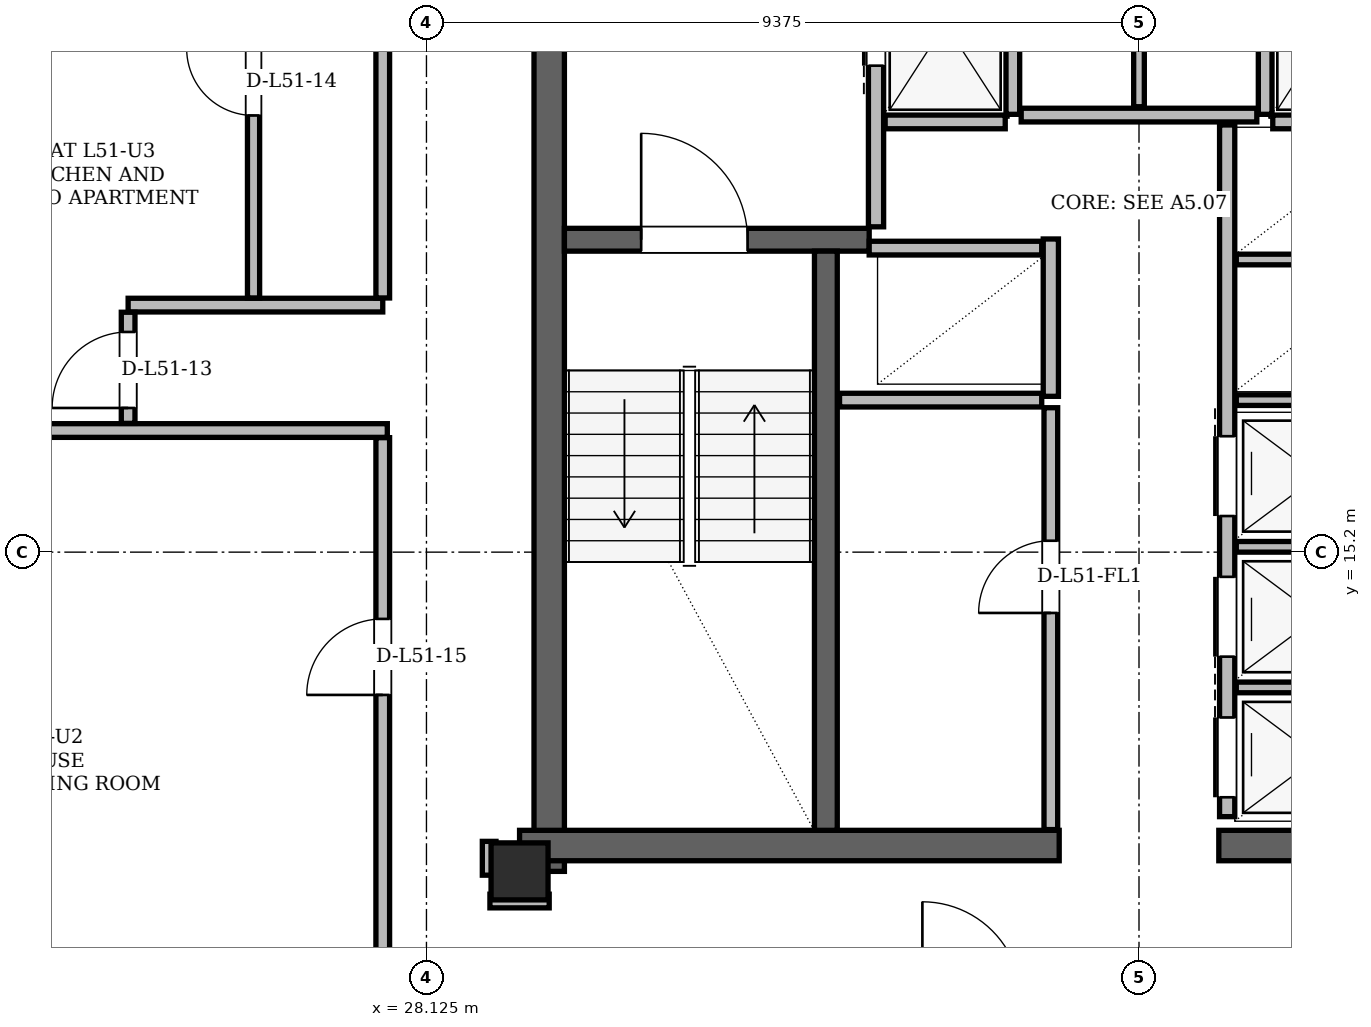
"""IFC4 building model, lengths in metres.
Left out: names, types, materials, properties, quantities, classifications, styles, units other than length and angle.
Written with IfcOpenShell. Run it as: python <this file> out.ifc"""

import sys

from ifc_helpers import new_model, si_unit, direction, frame, frame_2d, origin, origin_2d, place, context, subcontext, project, spatial, rectangle, hollow_rectangle, extrude, element, fill, save


model = new_model("IFC4")
c1 = context("Model", 3, precision=1e-05, world=origin(), true_north=direction((0.0, 1.0)))
c2 = subcontext(c1, "Body", "Model", "MODEL_VIEW")
j1 = project(units=[si_unit("LENGTHUNIT", "METRE"), si_unit("PLANEANGLEUNIT", "RADIAN")], contexts=[c1])
p1 = place(None, origin())
s1 = spatial("IfcSite", under=j1, at=p1, CompositionType="ELEMENT")
p2 = place(p1, origin())
s2 = spatial("IfcBuilding", under=s1, at=p2, CompositionType="ELEMENT")
p3 = place(p2, frame((0.0, 0.0, 193.8)))
s3 = spatial("IfcBuildingStorey", under=s2, at=p3, CompositionType="ELEMENT", Elevation=193.8)
p4 = place(p3, frame((29.35, 11.0, 0.0), z_axis=(0.0, 0.0, 1.0), x_axis=(1.0, 0.0, 0.0)))
e1 = element("IfcColumn", 1, at=p4, inside=s3, PredefinedType="COLUMN", context=c2, shape_type="SweptSolid", body=[
    extrude(hollow_rectangle(XDim=0.75, YDim=0.75, WallThickness=0.06, at=origin_2d()), origin(), (0.0, 0.0, 1.0), 3.6),
])
p5 = place(p3, frame((29.74, 11.0, 0.0), z_axis=(0.0, 0.0, 1.0), x_axis=(0.0, 1.0, 0.0)))
e2 = element("IfcWall", 2, at=p5, inside=s3, PredefinedType="SHEAR", context=c2, shape_type="SweptSolid", body=[
    extrude(rectangle(XDim=13.3, YDim=0.4, at=frame_2d((6.65, 0.0))), origin(), (0.0, 0.0, 1.0), 3.38),
])
for number, where, z_axis, x_axis in (
    (3, (29.35, 11.34, 0.0), (0.0, 0.0, 1.0), (1.0, 0.0, 0.0)),
    (4, (38.55, 11.34, 0.0), (0.0, 0.0, 1.0), (1.0, 0.0, 0.0)),
):
    element("IfcWall", number, at=place(p3, frame(where, z_axis=z_axis, x_axis=x_axis)), inside=s3, PredefinedType="SHEAR", context=c2, shape_type="SweptSolid", body=[
        extrude(rectangle(XDim=7.1, YDim=0.4, at=frame_2d((3.55, 0.0))), origin(), (0.0, 0.0, 1.0), 3.38),
    ])
p6 = place(p3, frame((29.94, 19.31, 0.0), z_axis=(0.0, 0.0, 1.0), x_axis=(1.0, 0.0, 0.0)))
e5 = element("IfcWall", 5, at=p6, inside=s3, PredefinedType="SHEAR", context=c2, shape_type="SweptSolid", body=[
    extrude(rectangle(XDim=4.01, YDim=0.3, at=frame_2d((2.005, 0.0))), origin(), (0.0, 0.0, 1.0), 3.38),
])
p7 = place(p6, frame((1.01, 0.0, 0.0)))
e6 = element("IfcOpeningElement", 6, at=p7, cuts=e5, PredefinedType="OPENING", context=c2, shape_type="SweptSolid", body=[
    extrude(rectangle(XDim=1.4, YDim=2.2, at=frame_2d((0.7, 1.1))), frame((0.0, 0.15, 0.0), z_axis=(0.0, -1.0, 0.0), x_axis=(1.0, 0.0, 0.0)), (0.0, 0.0, 1.0), 0.3),
])
p8 = place(p3, frame((33.38, 11.54, 0.0), z_axis=(0.0, 0.0, 1.0), x_axis=(0.0, 1.0, 0.0)))
e7 = element("IfcWall", 7, at=p8, inside=s3, PredefinedType="SHEAR", context=c2, shape_type="SweptSolid", body=[
    extrude(rectangle(XDim=7.62, YDim=0.3, at=frame_2d((3.81, 0.0))), origin(), (0.0, 0.0, 1.0), 3.38),
])
p9 = place(p3, frame((33.691, 43.219, 0.0), z_axis=(0.0, 0.0, 1.0), x_axis=(-0.499997159266, -0.866027043877, 0.0)))
e8 = element("IfcWall", 8, at=p9, inside=s3, PredefinedType="SOLIDWALL", context=c2, shape_type="SweptSolid", body=[
    extrude(rectangle(XDim=36.235, YDim=0.29, at=frame_2d((18.117, 0.0))), origin(), (0.0, 0.0, 1.0), 2.677),
])
p10 = place(p9, frame((6.579, 0.0, 0.0)))
e9 = element("IfcOpeningElement", 9, at=p10, cuts=e8, PredefinedType="OPENING", context=c2, shape_type="SweptSolid", body=[
    extrude(rectangle(XDim=1.5, YDim=2.2, at=frame_2d((0.75, 1.1))), frame((0.0, 0.145, 0.0), z_axis=(0.0, -1.0, 0.0), x_axis=(1.0, 0.0, 0.0)), (0.0, 0.0, 1.0), 0.29),
])
p11 = place(p9, frame((26.7, 0.0, 0.0)))
e10 = element("IfcOpeningElement", 10, at=p11, cuts=e8, PredefinedType="OPENING", context=c2, shape_type="SweptSolid", body=[
    extrude(rectangle(XDim=1.5, YDim=2.2, at=frame_2d((0.75, 1.1))), frame((0.0, 0.145, 0.0), z_axis=(0.0, -1.0, 0.0), x_axis=(1.0, 0.0, 0.0)), (0.0, 0.0, 1.0), 0.29),
])
p12 = place(p9, frame((32.74, 0.0, 0.85)))
e11 = element("IfcOpeningElement", 11, at=p12, cuts=e8, PredefinedType="OPENING", context=c2, shape_type="SweptSolid", body=[
    extrude(rectangle(XDim=2.4, YDim=1.717, at=frame_2d((1.2, 0.858))), frame((0.0, 0.145, 0.0), z_axis=(0.0, -1.0, 0.0), x_axis=(1.0, 0.0, 0.0)), (0.0, 0.0, 1.0), 0.29),
])
p13 = place(p9, frame((21.971, 0.0, 0.85)))
e12 = element("IfcOpeningElement", 12, at=p13, cuts=e8, PredefinedType="OPENING", context=c2, shape_type="SweptSolid", body=[
    extrude(rectangle(XDim=2.0, YDim=1.717, at=frame_2d((1.0, 0.858))), frame((0.0, 0.145, 0.0), z_axis=(0.0, -1.0, 0.0), x_axis=(1.0, 0.0, 0.0)), (0.0, 0.0, 1.0), 0.29),
])
p14 = place(p9, frame((2.383, 0.0, 0.85)))
e13 = element("IfcOpeningElement", 13, at=p14, cuts=e8, PredefinedType="OPENING", context=c2, shape_type="SweptSolid", body=[
    extrude(rectangle(XDim=1.6, YDim=1.7, at=frame_2d((0.8, 0.85))), frame((0.0, 0.145, 0.0), z_axis=(0.0, -1.0, 0.0), x_axis=(1.0, 0.0, 0.0)), (0.0, 0.0, 1.0), 0.29),
])
p15 = place(p9, frame((13.348, 0.0, 0.85)))
e14 = element("IfcOpeningElement", 14, at=p15, cuts=e8, PredefinedType="OPENING", context=c2, shape_type="SweptSolid", body=[
    extrude(rectangle(XDim=3.0, YDim=1.717, at=frame_2d((1.5, 0.858))), frame((0.0, 0.145, 0.0), z_axis=(0.0, -1.0, 0.0), x_axis=(1.0, 0.0, 0.0)), (0.0, 0.0, 1.0), 0.29),
])
p16 = place(p3, frame((34.04, 19.48, 0.0), z_axis=(0.0, 0.0, 1.0), x_axis=(0.0, 1.0, 0.0)))
e15 = element("IfcWall", 15, at=p16, inside=s3, PredefinedType="PARTITIONING", context=c2, shape_type="SweptSolid", body=[
    extrude(rectangle(XDim=4.5, YDim=0.2, at=frame_2d((2.25, 0.0))), origin(), (0.0, 0.0, 1.0), 3.38),
])
p17 = place(p16, frame((2.12, 0.0, 0.0)))
e16 = element("IfcOpeningElement", 16, at=p17, cuts=e15, PredefinedType="OPENING", context=c2, shape_type="SweptSolid", body=[
    extrude(rectangle(XDim=1.1, YDim=2.2, at=frame_2d((0.55, 1.1))), frame((0.0, 0.1, 0.0), z_axis=(0.0, -1.0, 0.0), x_axis=(1.0, 0.0, 0.0)), (0.0, 0.0, 1.0), 0.2),
])
p18 = place(p3, frame((35.84, 20.96, 0.0), z_axis=(0.0, 0.0, 1.0), x_axis=(0.0, 1.0, 0.0)))
e17 = element("IfcWall", 17, at=p18, inside=s3, PredefinedType="PARTITIONING", context=c2, shape_type="SweptSolid", body=[
    extrude(rectangle(XDim=3.02, YDim=0.18, at=frame_2d((1.51, 0.0))), origin(), (0.0, 0.0, 1.0), 3.38),
])
p19 = place(p3, frame((34.16, 20.86, 0.0), z_axis=(0.0, 0.0, 1.0), x_axis=(1.0, 0.0, 0.0)))
e18 = element("IfcWall", 18, at=p19, inside=s3, PredefinedType="PARTITIONING", context=c2, shape_type="SweptSolid", body=[
    extrude(rectangle(XDim=1.58, YDim=0.18, at=frame_2d((0.79, 0.0))), origin(), (0.0, 0.0, 1.0), 3.38),
])
p20 = place(p3, frame((39.16, 20.96, 0.0), z_axis=(0.0, 0.0, 1.0), x_axis=(0.0, 1.0, 0.0)))
e19 = element("IfcWall", 19, at=p20, inside=s3, PredefinedType="PARTITIONING", context=c2, shape_type="SweptSolid", body=[
    extrude(rectangle(XDim=3.02, YDim=0.18, at=frame_2d((1.51, 0.0))), origin(), (0.0, 0.0, 1.0), 3.38),
])
p21 = place(p3, frame((39.26, 20.86, 0.0), z_axis=(0.0, 0.0, 1.0), x_axis=(1.0, 0.0, 0.0)))
e20 = element("IfcWall", 20, at=p21, inside=s3, PredefinedType="PARTITIONING", context=c2, shape_type="SweptSolid", body=[
    extrude(rectangle(XDim=1.58, YDim=0.18, at=frame_2d((0.79, 0.0))), origin(), (0.0, 0.0, 1.0), 3.38),
])
p22 = place(p3, frame((36.34, 17.25, 0.0), z_axis=(0.0, 0.0, 1.0), x_axis=(0.0, 1.0, 0.0)))
e21 = element("IfcWall", 21, at=p22, inside=s3, PredefinedType="PARTITIONING", context=c2, shape_type="SweptSolid", body=[
    extrude(rectangle(XDim=2.07, YDim=0.2, at=frame_2d((1.035, 0.0))), origin(), (0.0, 0.0, 1.0), 3.38),
])
p23 = place(p3, frame((33.95, 19.2, 0.0), z_axis=(0.0, 0.0, 1.0), x_axis=(1.0, 0.0, 0.0)))
e22 = element("IfcWall", 22, at=p23, inside=s3, PredefinedType="PARTITIONING", context=c2, shape_type="SweptSolid", body=[
    extrude(rectangle(XDim=2.27, YDim=0.18, at=frame_2d((1.135, 0.0))), origin(), (0.0, 0.0, 1.0), 3.38),
])
p24 = place(p3, frame((33.56, 17.2, 0.0), z_axis=(0.0, 0.0, 1.0), x_axis=(1.0, 0.0, 0.0)))
e23 = element("IfcWall", 23, at=p24, inside=s3, PredefinedType="PARTITIONING", context=c2, shape_type="SweptSolid", body=[
    extrude(rectangle(XDim=2.66, YDim=0.18, at=frame_2d((1.33, 0.0))), origin(), (0.0, 0.0, 1.0), 3.38),
])
p25 = place(p3, frame((36.34, 11.55, 0.0), z_axis=(0.0, 0.0, 1.0), x_axis=(0.0, 1.0, 0.0)))
e24 = element("IfcWall", 24, at=p25, inside=s3, PredefinedType="PARTITIONING", context=c2, shape_type="SweptSolid", body=[
    extrude(rectangle(XDim=5.55, YDim=0.18, at=frame_2d((2.775, 0.0))), origin(), (0.0, 0.0, 1.0), 3.38),
])
p26 = place(p25, frame((2.85, 0.0, 0.0)))
e25 = element("IfcOpeningElement", 25, at=p26, cuts=e24, PredefinedType="OPENING", context=c2, shape_type="SweptSolid", body=[
    extrude(rectangle(XDim=0.95, YDim=2.1, at=frame_2d((0.475, 1.05))), frame((0.0, 0.09, 0.0), z_axis=(0.0, -1.0, 0.0), x_axis=(1.0, 0.0, 0.0)), (0.0, 0.0, 1.0), 0.18),
])
p27 = place(p3, frame((38.66, 11.72, 0.0), z_axis=(0.0, 0.0, 1.0), x_axis=(0.0, 1.0, 0.0)))
e26 = element("IfcWall", 26, at=p27, inside=s3, PredefinedType="PARTITIONING", context=c2, shape_type="SweptSolid", body=[
    extrude(rectangle(XDim=9.1, YDim=0.2, at=frame_2d((4.55, 0.0))), origin(), (0.0, 0.0, 1.0), 3.38),
])
p28 = place(p27, frame((0.255, 0.0, 0.0)))
e27 = element("IfcOpeningElement", 27, at=p28, cuts=e26, PredefinedType="OPENING", context=c2, shape_type="SweptSolid", body=[
    extrude(rectangle(XDim=1.05, YDim=2.15, at=frame_2d((0.525, 1.075))), frame((0.0, 0.1, 0.0), z_axis=(0.0, -1.0, 0.0), x_axis=(1.0, 0.0, 0.0)), (0.0, 0.0, 1.0), 0.2),
])
p29 = place(p27, frame((2.105, 0.0, 0.0)))
e28 = element("IfcOpeningElement", 28, at=p29, cuts=e26, PredefinedType="OPENING", context=c2, shape_type="SweptSolid", body=[
    extrude(rectangle(XDim=1.05, YDim=2.15, at=frame_2d((0.525, 1.075))), frame((0.0, 0.1, 0.0), z_axis=(0.0, -1.0, 0.0), x_axis=(1.0, 0.0, 0.0)), (0.0, 0.0, 1.0), 0.2),
])
p30 = place(p27, frame((3.955, 0.0, 0.0)))
e29 = element("IfcOpeningElement", 29, at=p30, cuts=e26, PredefinedType="OPENING", context=c2, shape_type="SweptSolid", body=[
    extrude(rectangle(XDim=1.05, YDim=2.15, at=frame_2d((0.525, 1.075))), frame((0.0, 0.1, 0.0), z_axis=(0.0, -1.0, 0.0), x_axis=(1.0, 0.0, 0.0)), (0.0, 0.0, 1.0), 0.2),
])
for number, where, z_axis, x_axis in (
    (30, (38.78, 13.42, 0.0), (0.0, 0.0, 1.0), (1.0, 0.0, 0.0)),
    (31, (38.78, 15.27, 0.0), (0.0, 0.0, 1.0), (1.0, 0.0, 0.0)),
    (32, (38.78, 17.2, 0.0), (0.0, 0.0, 1.0), (1.0, 0.0, 0.0)),
    (33, (38.78, 19.05, 0.0), (0.0, 0.0, 1.0), (1.0, 0.0, 0.0)),
):
    element("IfcWall", number, at=place(p3, frame(where, z_axis=z_axis, x_axis=x_axis)), inside=s3, PredefinedType="PARTITIONING", context=c2, shape_type="SweptSolid", body=[
        extrude(rectangle(XDim=2.66, YDim=0.14, at=frame_2d((1.33, 0.0))), origin(), (0.0, 0.0, 1.0), 3.38),
    ])
p31 = place(p3, frame((35.95, 20.95, 0.0), z_axis=(0.0, 0.0, 1.0), x_axis=(1.0, 0.0, 0.0)))
e34 = element("IfcWall", 34, at=p31, inside=s3, PredefinedType="PARTITIONING", context=c2, shape_type="SweptSolid", body=[
    extrude(rectangle(XDim=3.1, YDim=0.18, at=frame_2d((1.55, 0.0))), origin(), (0.0, 0.0, 1.0), 3.38),
])
p32 = place(p3, frame((37.5, 21.06, 0.0), z_axis=(0.0, 0.0, 1.0), x_axis=(0.0, 1.0, 0.0)))
e35 = element("IfcWall", 35, at=p32, inside=s3, PredefinedType="PARTITIONING", context=c2, shape_type="SweptSolid", body=[
    extrude(rectangle(XDim=2.92, YDim=0.14, at=frame_2d((1.46, 0.0))), origin(), (0.0, 0.0, 1.0), 3.38),
])
p33 = place(p3, frame((28.96, 10.61, 0.0), z_axis=(0.0, 0.0, 1.0), x_axis=(1.0, 0.0, 0.0)))
e36 = element("IfcWall", 36, at=p33, inside=s3, PredefinedType="PARTITIONING", context=c2, shape_type="SweptSolid", body=[
    extrude(rectangle(XDim=0.78, YDim=0.18, at=frame_2d((0.39, 0.0))), origin(), (0.0, 0.0, 1.0), 3.38),
])
p34 = place(p3, frame((18.706, 16.8, 0.0), z_axis=(0.0, 0.0, 1.0), x_axis=(1.0, 0.0, 0.0)))
e37 = element("IfcWall", 37, at=p34, inside=s3, PredefinedType="PARTITIONING", context=c2, shape_type="SweptSolid", body=[
    extrude(rectangle(XDim=8.904, YDim=0.18, at=frame_2d((4.452, 0.0))), origin(), (0.0, 0.0, 1.0), 3.38),
])
p35 = place(p3, frame((24.2, 18.45, 0.0), z_axis=(0.0, 0.0, 1.0), x_axis=(1.0, 0.0, 0.0)))
e38 = element("IfcWall", 38, at=p35, inside=s3, PredefinedType="PARTITIONING", context=c2, shape_type="SweptSolid", body=[
    extrude(rectangle(XDim=3.35, YDim=0.18, at=frame_2d((1.675, 0.0))), origin(), (0.0, 0.0, 1.0), 3.38),
])
p36 = place(p3, frame((24.2, 16.894, 0.0), z_axis=(0.0, 0.0, 1.0), x_axis=(0.0, 1.0, 0.0)))
e39 = element("IfcWall", 39, at=p36, inside=s3, PredefinedType="PARTITIONING", context=c2, shape_type="SweptSolid", body=[
    extrude(rectangle(XDim=1.462, YDim=0.18, at=frame_2d((0.731, 0.0))), origin(), (0.0, 0.0, 1.0), 3.38),
])
p37 = place(p36, frame((0.203, 0.0, 0.0)))
e40 = element("IfcOpeningElement", 40, at=p37, cuts=e39, PredefinedType="OPENING", context=c2, shape_type="SweptSolid", body=[
    extrude(rectangle(XDim=1.0, YDim=2.18, at=frame_2d((0.5, 1.09))), frame((0.0, 0.09, 0.0), z_axis=(0.0, -1.0, 0.0), x_axis=(1.0, 0.0, 0.0)), (0.0, 0.0, 1.0), 0.18),
])
p38 = place(p3, frame((25.85, 18.544, 0.0), z_axis=(0.0, 0.0, 1.0), x_axis=(0.0, 1.0, 0.0)))
e41 = element("IfcWall", 41, at=p38, inside=s3, PredefinedType="PARTITIONING", context=c2, shape_type="SweptSolid", body=[
    extrude(rectangle(XDim=5.682, YDim=0.16, at=frame_2d((2.841, 0.0))), origin(), (0.0, 0.0, 1.0), 3.38),
])
p39 = place(p38, frame((2.401, 0.0, 0.0)))
e42 = element("IfcOpeningElement", 42, at=p39, cuts=e41, PredefinedType="OPENING", context=c2, shape_type="SweptSolid", body=[
    extrude(rectangle(XDim=0.88, YDim=2.08, at=frame_2d((0.44, 1.04))), frame((0.0, 0.08, 0.0), z_axis=(0.0, -1.0, 0.0), x_axis=(1.0, 0.0, 0.0)), (0.0, 0.0, 1.0), 0.16),
])
p40 = place(p3, frame((27.55, 9.394, 0.0), z_axis=(0.0, 0.0, 1.0), x_axis=(0.0, 1.0, 0.0)))
e43 = element("IfcWall", 43, at=p40, inside=s3, PredefinedType="PARTITIONING", context=c2, shape_type="SweptSolid", body=[
    extrude(rectangle(XDim=7.312, YDim=0.18, at=frame_2d((3.656, 0.0))), origin(), (0.0, 0.0, 1.0), 2.913),
])
p41 = place(p40, frame((3.927, 0.0, 0.0)))
e44 = element("IfcOpeningElement", 44, at=p41, cuts=e43, PredefinedType="OPENING", context=c2, shape_type="SweptSolid", body=[
    extrude(rectangle(XDim=1.0, YDim=2.18, at=frame_2d((0.5, 1.09))), frame((0.0, 0.09, 0.0), z_axis=(0.0, -1.0, 0.0), x_axis=(1.0, 0.0, 0.0)), (0.0, 0.0, 1.0), 0.18),
])
p42 = place(p3, frame((27.55, 18.544, 0.0), z_axis=(0.0, 0.0, 1.0), x_axis=(0.0, 1.0, 0.0)))
e45 = element("IfcWall", 45, at=p42, inside=s3, PredefinedType="PARTITIONING", context=c2, shape_type="SweptSolid", body=[
    extrude(rectangle(XDim=7.332, YDim=0.18, at=frame_2d((3.666, 0.0))), origin(), (0.0, 0.0, 1.0), 3.38),
])
p43 = place(p3, frame((28.95, 10.95, 0.0), z_axis=(0.0, 0.0, 1.0), x_axis=(0.0, 1.0, 0.0)))
e46 = element("IfcWall", 46, at=p43, inside=s3, PredefinedType="PARTITIONING", context=c2, shape_type="SweptSolid", body=[
    extrude(rectangle(XDim=0.445, YDim=0.18, at=frame_2d((0.223, 0.0))), origin(), (0.0, 0.0, 1.0), 2.913),
])
p44 = place(p26, origin())
e47 = element("IfcDoor", 47, at=p44, inside=s3, OperationType="SINGLE_SWING_LEFT", PredefinedType="DOOR", context=c2, shape_type="SweptSolid", body=[
    extrude(rectangle(XDim=0.95, YDim=2.1, at=frame_2d((0.475, 1.05))), frame((0.0, 0.025, 0.0), z_axis=(0.0, -1.0, 0.0), x_axis=(1.0, 0.0, 0.0)), (0.0, 0.0, 1.0), 0.05),
])
fill(e25, e47)
p45 = place(p17, origin())
e48 = element("IfcDoor", 48, at=p45, inside=s3, OperationType="SLIDING_TO_LEFT", PredefinedType="DOOR", context=c2, shape_type="SweptSolid", body=[
    extrude(rectangle(XDim=1.1, YDim=2.2, at=frame_2d((0.55, 1.1))), frame((0.0, 0.025, 0.0), z_axis=(0.0, -1.0, 0.0), x_axis=(1.0, 0.0, 0.0)), (0.0, 0.0, 1.0), 0.05),
])
fill(e16, e48)
p46 = place(p28, origin())
e49 = element("IfcDoor", 49, at=p46, inside=s3, OperationType="SLIDING_TO_RIGHT", PredefinedType="DOOR", context=c2, shape_type="SweptSolid", body=[
    extrude(rectangle(XDim=1.05, YDim=2.15, at=frame_2d((0.525, 1.075))), frame((0.0, 0.025, 0.0), z_axis=(0.0, -1.0, 0.0), x_axis=(1.0, 0.0, 0.0)), (0.0, 0.0, 1.0), 0.05),
])
fill(e27, e49)
p47 = place(p29, origin())
e50 = element("IfcDoor", 50, at=p47, inside=s3, OperationType="SLIDING_TO_LEFT", PredefinedType="DOOR", context=c2, shape_type="SweptSolid", body=[
    extrude(rectangle(XDim=1.05, YDim=2.15, at=frame_2d((0.525, 1.075))), frame((0.0, 0.025, 0.0), z_axis=(0.0, -1.0, 0.0), x_axis=(1.0, 0.0, 0.0)), (0.0, 0.0, 1.0), 0.05),
])
fill(e28, e50)
p48 = place(p30, origin())
e51 = element("IfcDoor", 51, at=p48, inside=s3, OperationType="SLIDING_TO_RIGHT", PredefinedType="DOOR", context=c2, shape_type="SweptSolid", body=[
    extrude(rectangle(XDim=1.05, YDim=2.15, at=frame_2d((0.525, 1.075))), frame((0.0, 0.025, 0.0), z_axis=(0.0, -1.0, 0.0), x_axis=(1.0, 0.0, 0.0)), (0.0, 0.0, 1.0), 0.05),
])
fill(e29, e51)
p49 = place(p7, origin())
e52 = element("IfcDoor", 52, at=p49, inside=s3, OperationType="SINGLE_SWING_LEFT", PredefinedType="DOOR", context=c2, shape_type="SweptSolid", body=[
    extrude(rectangle(XDim=1.4, YDim=2.2, at=frame_2d((0.7, 1.1))), frame((0.0, 0.025, 0.0), z_axis=(0.0, -1.0, 0.0), x_axis=(1.0, 0.0, 0.0)), (0.0, 0.0, 1.0), 0.05),
])
fill(e6, e52)
p50 = place(p37, origin())
e53 = element("IfcDoor", 53, at=p50, inside=s3, OperationType="SINGLE_SWING_LEFT", PredefinedType="DOOR", context=c2, shape_type="SweptSolid", body=[
    extrude(rectangle(XDim=1.0, YDim=2.18, at=frame_2d((0.5, 1.09))), frame((0.0, 0.025, 0.0), z_axis=(0.0, -1.0, 0.0), x_axis=(1.0, 0.0, 0.0)), (0.0, 0.0, 1.0), 0.05),
])
fill(e40, e53)
p51 = place(p39, origin())
e54 = element("IfcDoor", 54, at=p51, inside=s3, OperationType="SINGLE_SWING_RIGHT", PredefinedType="DOOR", context=c2, shape_type="SweptSolid", body=[
    extrude(rectangle(XDim=0.88, YDim=2.08, at=frame_2d((0.44, 1.04))), frame((0.0, 0.025, 0.0), z_axis=(0.0, -1.0, 0.0), x_axis=(1.0, 0.0, 0.0)), (0.0, 0.0, 1.0), 0.05),
])
fill(e42, e54)
p52 = place(p41, origin())
e55 = element("IfcDoor", 55, at=p52, inside=s3, OperationType="SINGLE_SWING_LEFT", PredefinedType="DOOR", context=c2, shape_type="SweptSolid", body=[
    extrude(rectangle(XDim=1.0, YDim=2.18, at=frame_2d((0.5, 1.09))), frame((0.0, 0.025, 0.0), z_axis=(0.0, -1.0, 0.0), x_axis=(1.0, 0.0, 0.0)), (0.0, 0.0, 1.0), 0.05),
])
fill(e44, e55)
save(model, sys.argv[1])
